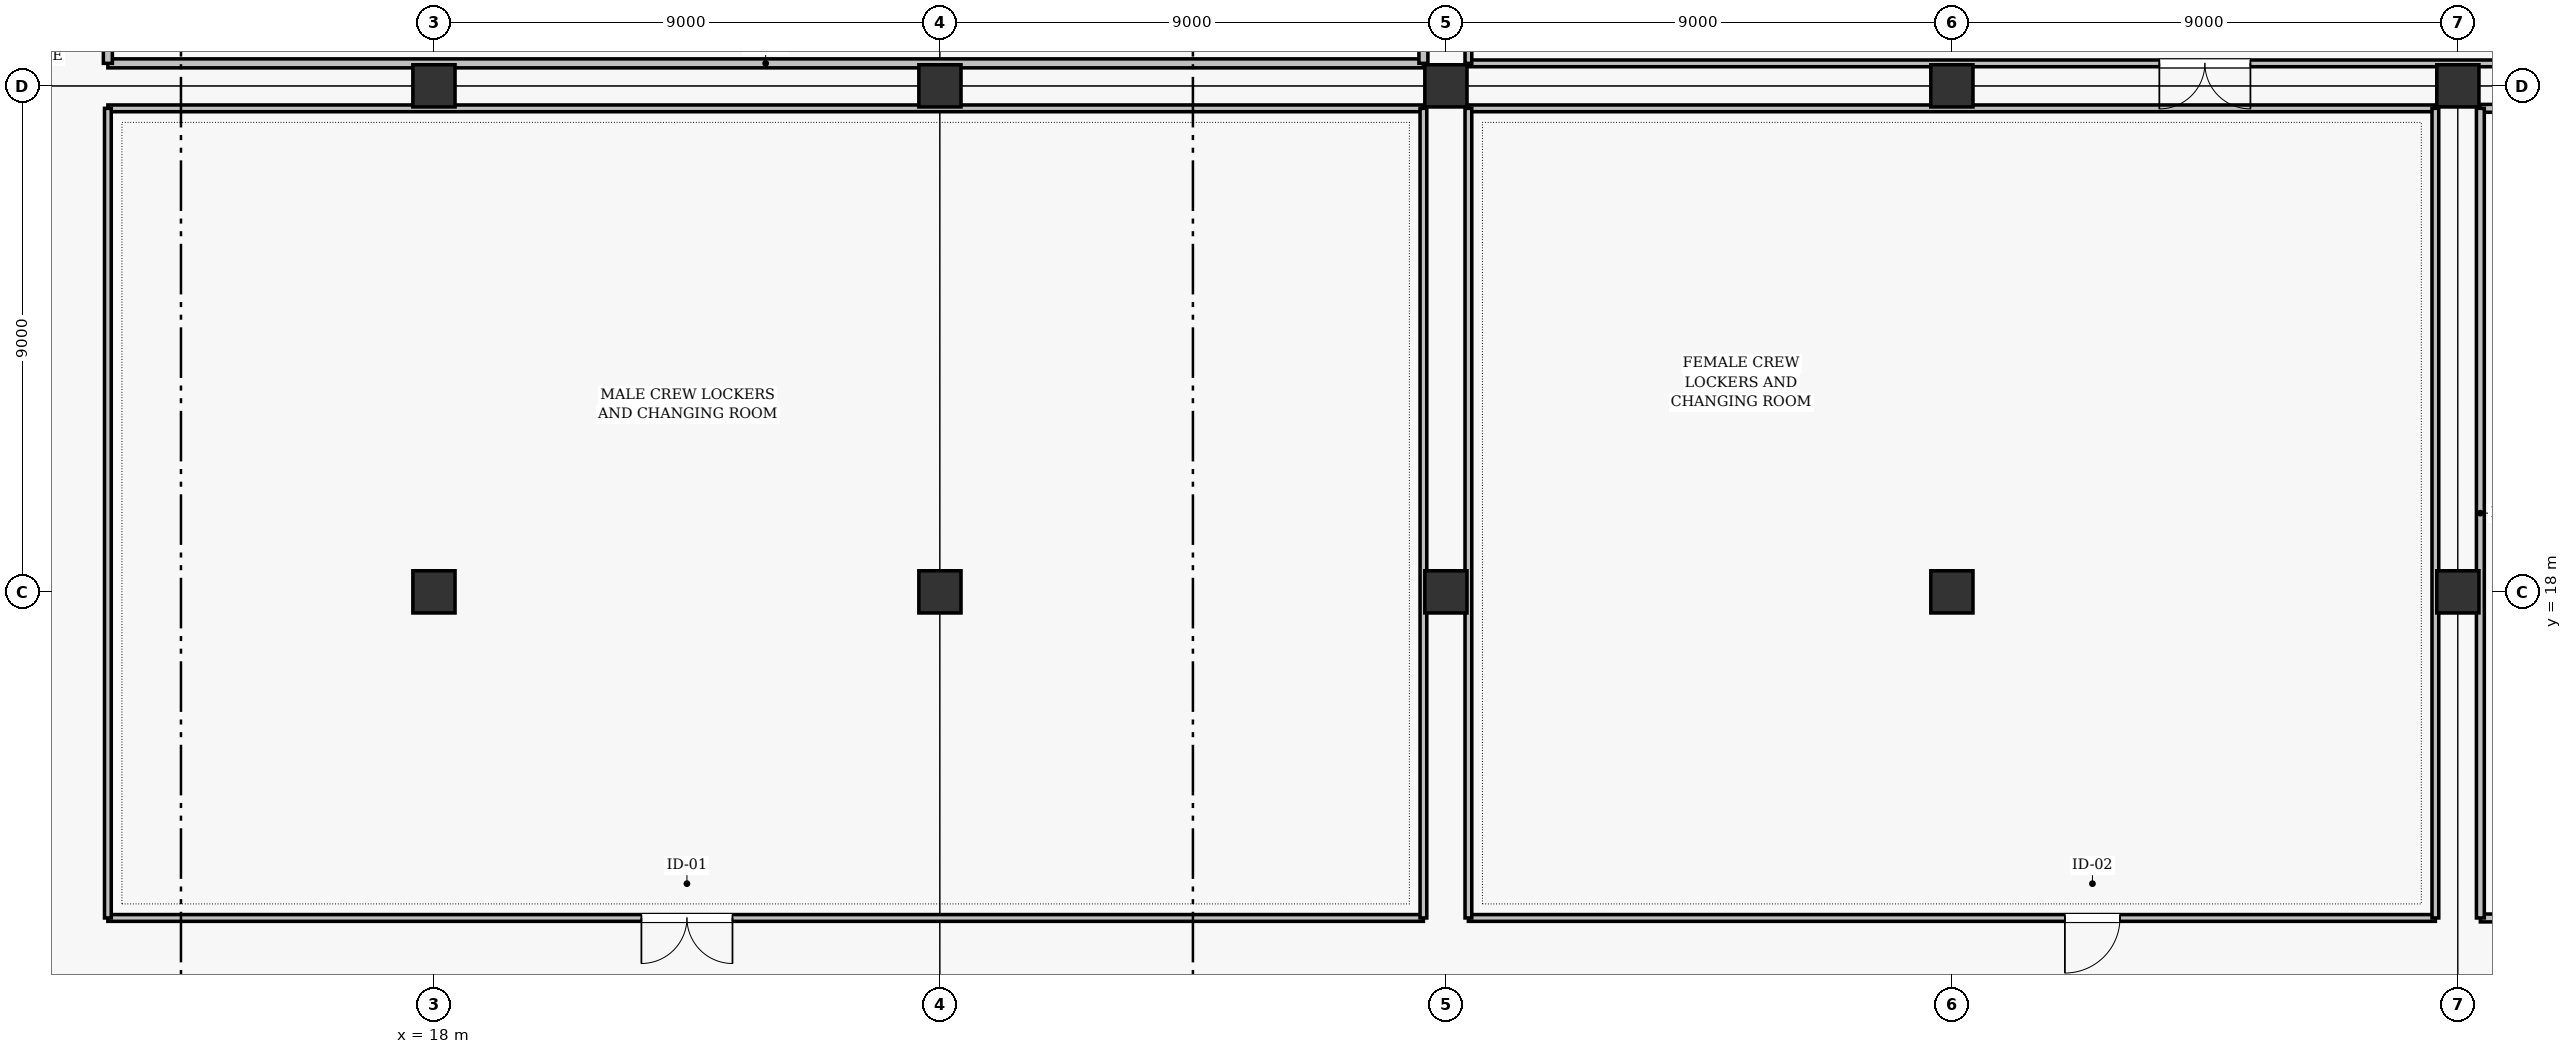
"""IFC4 building model, lengths in metres.
Left out: names, types, materials, properties, quantities, classifications, styles, units other than length and angle.
Written with IfcOpenShell. Run it as: python <this file> out.ifc"""

import sys

from ifc_helpers import new_model, si_unit, direction, frame, frame_2d, origin, origin_2d, place, context, subcontext, project, spatial, rectangle, extrude, element, fill, save


model = new_model("IFC4")
c1 = context("Model", 3, precision=1e-05, world=origin(), true_north=direction((0.0, 1.0)))
c2 = subcontext(c1, "Body", "Model", "MODEL_VIEW")
j1 = project(units=[si_unit("LENGTHUNIT", "METRE"), si_unit("PLANEANGLEUNIT", "RADIAN")], contexts=[c1])
p1 = place(None, origin())
s1 = spatial("IfcSite", under=j1, at=p1, CompositionType="ELEMENT")
p2 = place(p1, origin())
s2 = spatial("IfcBuilding", under=s1, at=p2, CompositionType="ELEMENT")
p3 = place(p2, origin())
s3 = spatial("IfcBuildingStorey", under=s2, at=p3, CompositionType="ELEMENT", Elevation=0.0)
for number, where, z_axis, x_axis in (
    (1, (18.0, 18.0, 0.0), (0.0, 0.0, 1.0), (1.0, 0.0, 0.0)),
    (2, (18.0, 27.0, 0.0), (0.0, 0.0, 1.0), (1.0, 0.0, 0.0)),
    (3, (27.0, 18.0, 0.0), (0.0, 0.0, 1.0), (1.0, 0.0, 0.0)),
    (4, (27.0, 27.0, 0.0), (0.0, 0.0, 1.0), (1.0, 0.0, 0.0)),
    (5, (36.0, 18.0, 0.0), (0.0, 0.0, 1.0), (1.0, 0.0, 0.0)),
    (6, (36.0, 27.0, 0.0), (0.0, 0.0, 1.0), (1.0, 0.0, 0.0)),
    (7, (45.0, 18.0, 0.0), (0.0, 0.0, 1.0), (1.0, 0.0, 0.0)),
    (8, (45.0, 27.0, 0.0), (0.0, 0.0, 1.0), (1.0, 0.0, 0.0)),
    (9, (54.0, 18.0, 0.0), (0.0, 0.0, 1.0), (1.0, 0.0, 0.0)),
    (10, (54.0, 27.0, 0.0), (0.0, 0.0, 1.0), (1.0, 0.0, 0.0)),
):
    element("IfcColumn", number, at=place(p3, frame(where, z_axis=z_axis, x_axis=x_axis)), inside=s3, PredefinedType="COLUMN", context=c2, shape_type="SweptSolid", body=[
        extrude(rectangle(XDim=0.75, YDim=0.75, at=origin_2d()), origin(), (0.0, 0.0, 1.0), 4.8),
    ])
p4 = place(p3, frame((12.2, 12.2, 0.0), z_axis=(0.0, 0.0, 1.0), x_axis=(1.0, 0.0, 0.0)))
e11 = element("IfcWall", 11, at=p4, inside=s3, PredefinedType="PARTITIONING", context=c2, shape_type="SweptSolid", body=[
    extrude(rectangle(XDim=23.4, YDim=0.12, at=frame_2d((11.7, 0.0))), origin(), (0.0, 0.0, 1.0), 3.895),
])
p5 = place(p4, frame((9.49, 0.0, 0.0)))
e12 = element("IfcOpeningElement", 12, at=p5, cuts=e11, PredefinedType="OPENING", context=c2, shape_type="SweptSolid", body=[
    extrude(rectangle(XDim=1.62, YDim=2.14, at=frame_2d((0.81, 1.07))), frame((0.0, 0.07, 0.0), z_axis=(0.0, -1.0, 0.0), x_axis=(1.0, 0.0, 0.0)), (0.0, 0.0, 1.0), 0.14),
])
p6 = place(p3, frame((12.2, 26.6, 0.0), z_axis=(0.0, 0.0, 1.0), x_axis=(1.0, 0.0, 0.0)))
e13 = element("IfcWall", 13, at=p6, inside=s3, PredefinedType="PARTITIONING", context=c2, shape_type="SweptSolid", body=[
    extrude(rectangle(XDim=23.4, YDim=0.12, at=frame_2d((11.7, 0.0))), origin(), (0.0, 0.0, 1.0), 3.895),
])
for number, where, z_axis, x_axis in (
    (14, (12.2, 12.2, 0.0), (0.0, 0.0, 1.0), (0.0, 1.0, 0.0)),
    (15, (35.6, 12.2, 0.0), (0.0, 0.0, 1.0), (0.0, 1.0, 0.0)),
):
    element("IfcWall", number, at=place(p3, frame(where, z_axis=z_axis, x_axis=x_axis)), inside=s3, PredefinedType="PARTITIONING", context=c2, shape_type="SweptSolid", body=[
        extrude(rectangle(XDim=14.4, YDim=0.12, at=frame_2d((7.2, 0.0))), origin(), (0.0, 0.0, 1.0), 3.795),
    ])
p7 = place(p3, frame((36.4, 12.2, 0.0), z_axis=(0.0, 0.0, 1.0), x_axis=(1.0, 0.0, 0.0)))
e16 = element("IfcWall", 16, at=p7, inside=s3, PredefinedType="PARTITIONING", context=c2, shape_type="SweptSolid", body=[
    extrude(rectangle(XDim=17.2, YDim=0.12, at=frame_2d((8.6, 0.0))), origin(), (0.0, 0.0, 1.0), 3.895),
])
p8 = place(p7, frame((10.61, 0.0, 0.0)))
e17 = element("IfcOpeningElement", 17, at=p8, cuts=e16, PredefinedType="OPENING", context=c2, shape_type="SweptSolid", body=[
    extrude(rectangle(XDim=0.98, YDim=2.08, at=frame_2d((0.49, 1.04))), frame((0.0, 0.07, 0.0), z_axis=(0.0, -1.0, 0.0), x_axis=(1.0, 0.0, 0.0)), (0.0, 0.0, 1.0), 0.14),
])
p9 = place(p3, frame((36.4, 26.6, 0.0), z_axis=(0.0, 0.0, 1.0), x_axis=(1.0, 0.0, 0.0)))
e18 = element("IfcWall", 18, at=p9, inside=s3, PredefinedType="PARTITIONING", context=c2, shape_type="SweptSolid", body=[
    extrude(rectangle(XDim=17.2, YDim=0.12, at=frame_2d((8.6, 0.0))), origin(), (0.0, 0.0, 1.0), 3.895),
])
for number, where, z_axis, x_axis in (
    (19, (36.4, 12.2, 0.0), (0.0, 0.0, 1.0), (0.0, 1.0, 0.0)),
    (20, (53.6, 12.2, 0.0), (0.0, 0.0, 1.0), (0.0, 1.0, 0.0)),
):
    element("IfcWall", number, at=place(p3, frame(where, z_axis=z_axis, x_axis=x_axis)), inside=s3, PredefinedType="PARTITIONING", context=c2, shape_type="SweptSolid", body=[
        extrude(rectangle(XDim=14.4, YDim=0.12, at=frame_2d((7.2, 0.0))), origin(), (0.0, 0.0, 1.0), 3.795),
    ])
p10 = place(p3, frame((54.4, 12.2, 0.0), z_axis=(0.0, 0.0, 1.0), x_axis=(1.0, 0.0, 0.0)))
e21 = element("IfcWall", 21, at=p10, inside=s3, PredefinedType="PARTITIONING", context=c2, shape_type="SweptSolid", body=[
    extrude(rectangle(XDim=13.0, YDim=0.14, at=frame_2d((6.5, 0.0))), origin(), (0.0, 0.0, 1.0), 3.895),
])
p11 = place(p10, frame((3.645, 0.0, 0.0)))
e22 = element("IfcOpeningElement", 22, at=p11, cuts=e21, PredefinedType="OPENING", context=c2, shape_type="SweptSolid", body=[
    extrude(rectangle(XDim=0.91, YDim=2.04, at=frame_2d((0.455, 1.02))), frame((0.0, 0.08, 0.0), z_axis=(0.0, -1.0, 0.0), x_axis=(1.0, 0.0, 0.0)), (0.0, 0.0, 1.0), 0.16),
])
p12 = place(p3, frame((54.4, 26.6, 0.0), z_axis=(0.0, 0.0, 1.0), x_axis=(1.0, 0.0, 0.0)))
e23 = element("IfcWall", 23, at=p12, inside=s3, PredefinedType="PARTITIONING", context=c2, shape_type="SweptSolid", body=[
    extrude(rectangle(XDim=13.0, YDim=0.14, at=frame_2d((6.5, 0.0))), origin(), (0.0, 0.0, 1.0), 3.895),
])
p13 = place(p3, frame((54.4, 12.2, 0.0), z_axis=(0.0, 0.0, 1.0), x_axis=(0.0, 1.0, 0.0)))
e24 = element("IfcWall", 24, at=p13, inside=s3, PredefinedType="PARTITIONING", context=c2, shape_type="SweptSolid", body=[
    extrude(rectangle(XDim=14.4, YDim=0.14, at=frame_2d((7.2, 0.0))), origin(), (0.0, 0.0, 1.0), 3.795),
])
p14 = place(p3, frame((12.2, 27.4, 0.0), z_axis=(0.0, 0.0, 1.0), x_axis=(1.0, 0.0, 0.0)))
e25 = element("IfcWall", 25, at=p14, inside=s3, PredefinedType="PARTITIONING", context=c2, shape_type="SweptSolid", body=[
    extrude(rectangle(XDim=23.4, YDim=0.16, at=frame_2d((11.7, 0.0))), origin(), (0.0, 0.0, 1.0), 3.895),
])
p15 = place(p3, frame((12.2, 27.4, 0.0), z_axis=(0.0, 0.0, 1.0), x_axis=(0.0, 1.0, 0.0)))
e26 = element("IfcWall", 26, at=p15, inside=s3, PredefinedType="PARTITIONING", context=c2, shape_type="SweptSolid", body=[
    extrude(rectangle(XDim=17.2, YDim=0.16, at=frame_2d((8.6, 0.0))), origin(), (0.0, 0.0, 1.0), 3.795),
])
p16 = place(p15, frame((3.34, 0.0, 0.0)))
e27 = element("IfcOpeningElement", 27, at=p16, cuts=e26, PredefinedType="OPENING", context=c2, shape_type="SweptSolid", body=[
    extrude(rectangle(XDim=1.52, YDim=2.16, at=frame_2d((0.76, 1.08))), frame((0.0, 0.09, 0.0), z_axis=(0.0, -1.0, 0.0), x_axis=(1.0, 0.0, 0.0)), (0.0, 0.0, 1.0), 0.18),
])
p17 = place(p3, frame((35.6, 27.4, 0.0), z_axis=(0.0, 0.0, 1.0), x_axis=(0.0, 1.0, 0.0)))
e28 = element("IfcWall", 28, at=p17, inside=s3, PredefinedType="PARTITIONING", context=c2, shape_type="SweptSolid", body=[
    extrude(rectangle(XDim=17.2, YDim=0.16, at=frame_2d((8.6, 0.0))), origin(), (0.0, 0.0, 1.0), 3.795),
])
p18 = place(p3, frame((36.4, 27.4, 0.0), z_axis=(0.0, 0.0, 1.0), x_axis=(1.0, 0.0, 0.0)))
e29 = element("IfcWall", 29, at=p18, inside=s3, PredefinedType="PARTITIONING", context=c2, shape_type="SweptSolid", body=[
    extrude(rectangle(XDim=26.2, YDim=0.12, at=frame_2d((13.1, 0.0))), origin(), (0.0, 0.0, 1.0), 3.895),
])
p19 = place(p18, frame((12.29, 0.0, 0.0)))
e30 = element("IfcOpeningElement", 30, at=p19, cuts=e29, PredefinedType="OPENING", context=c2, shape_type="SweptSolid", body=[
    extrude(rectangle(XDim=1.62, YDim=2.14, at=frame_2d((0.81, 1.07))), frame((0.0, 0.07, 0.0), z_axis=(0.0, -1.0, 0.0), x_axis=(1.0, 0.0, 0.0)), (0.0, 0.0, 1.0), 0.14),
])
p20 = place(p3, frame((36.4, 27.4, 0.0), z_axis=(0.0, 0.0, 1.0), x_axis=(0.0, 1.0, 0.0)))
e31 = element("IfcWall", 31, at=p20, inside=s3, PredefinedType="PARTITIONING", context=c2, shape_type="SweptSolid", body=[
    extrude(rectangle(XDim=17.2, YDim=0.12, at=frame_2d((8.6, 0.0))), origin(), (0.0, 0.0, 1.0), 3.795),
])
p21 = place(p5, frame((1.62, 0.0, 0.0), z_axis=(0.0, 0.0, 1.0), x_axis=(-1.0, 0.0, 0.0)))
e32 = element("IfcDoor", 32, at=p21, inside=s3, OperationType="DOUBLE_SWING_LEFT", PredefinedType="DOOR", context=c2, shape_type="SweptSolid", body=[
    extrude(rectangle(XDim=1.62, YDim=2.14, at=frame_2d((0.81, 1.07))), frame((0.0, 0.025, 0.0), z_axis=(0.0, -1.0, 0.0), x_axis=(1.0, 0.0, 0.0)), (0.0, 0.0, 1.0), 0.05),
])
fill(e12, e32)
p22 = place(p8, frame((0.98, 0.0, 0.0), z_axis=(0.0, 0.0, 1.0), x_axis=(-1.0, 0.0, 0.0)))
e33 = element("IfcDoor", 33, at=p22, inside=s3, OperationType="SINGLE_SWING_LEFT", PredefinedType="DOOR", context=c2, shape_type="SweptSolid", body=[
    extrude(rectangle(XDim=0.98, YDim=2.08, at=frame_2d((0.49, 1.04))), frame((0.0, 0.025, 0.0), z_axis=(0.0, -1.0, 0.0), x_axis=(1.0, 0.0, 0.0)), (0.0, 0.0, 1.0), 0.05),
])
fill(e17, e33)
p23 = place(p19, frame((1.62, 0.0, 0.0), z_axis=(0.0, 0.0, 1.0), x_axis=(-1.0, 0.0, 0.0)))
e34 = element("IfcDoor", 34, at=p23, inside=s3, OperationType="DOUBLE_SWING_LEFT", PredefinedType="DOOR", context=c2, shape_type="SweptSolid", body=[
    extrude(rectangle(XDim=1.62, YDim=2.14, at=frame_2d((0.81, 1.07))), frame((0.0, 0.025, 0.0), z_axis=(0.0, -1.0, 0.0), x_axis=(1.0, 0.0, 0.0)), (0.0, 0.0, 1.0), 0.05),
])
fill(e30, e34)
save(model, sys.argv[1])
